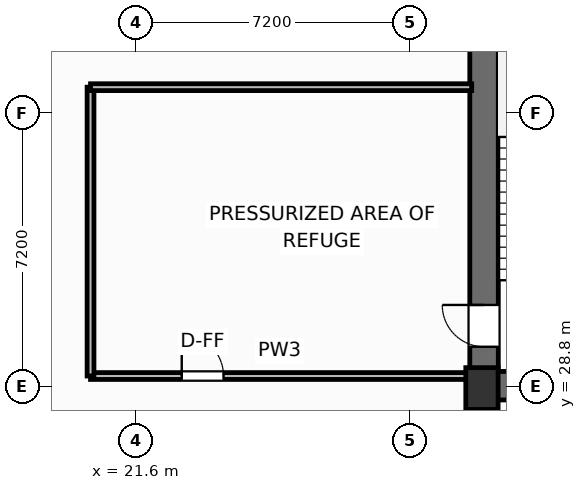
"""IFC4 building model, lengths in metres.
Left out: names, types, materials, properties, quantities, classifications, styles, units other than length and angle.
Written with IfcOpenShell. Run it as: python <this file> out.ifc"""

import sys

from ifc_helpers import new_model, si_unit, direction, frame, frame_2d, origin, origin_2d, place, context, subcontext, project, spatial, rectangle, extrude, element, fill, save


model = new_model("IFC4")
c1 = context("Model", 3, precision=1e-05, world=origin(), true_north=direction((0.0, 1.0)))
c2 = subcontext(c1, "Body", "Model", "MODEL_VIEW")
j1 = project(units=[si_unit("LENGTHUNIT", "METRE"), si_unit("PLANEANGLEUNIT", "RADIAN")], contexts=[c1])
p1 = place(None, origin())
s1 = spatial("IfcSite", under=j1, at=p1, CompositionType="ELEMENT")
p2 = place(p1, origin())
s2 = spatial("IfcBuilding", under=s1, at=p2, CompositionType="ELEMENT")
p3 = place(p2, frame((0.0, 0.0, 162.4)))
s3 = spatial("IfcBuildingStorey", under=s2, at=p3, CompositionType="ELEMENT", Elevation=162.4)
p4 = place(p3, frame((30.7, 28.75, 0.0), z_axis=(0.0, 0.0, 1.0), x_axis=(1.0, 0.0, 0.0)))
e1 = element("IfcColumn", 1, at=p4, inside=s3, PredefinedType="COLUMN", context=c2, shape_type="SweptSolid", body=[
    extrude(rectangle(XDim=0.85, YDim=1.1, at=origin_2d()), origin(), (0.0, 0.0, 1.0), 4.8),
])
p5 = place(p3, frame((30.755, 29.2, 0.0), z_axis=(0.0, 0.0, 1.0), x_axis=(0.0, 1.0, 0.0)))
e2 = element("IfcWall", 2, at=p5, inside=s3, PredefinedType="SHEAR", context=c2, shape_type="SweptSolid", body=[
    extrude(rectangle(XDim=9.22, YDim=0.75, at=frame_2d((4.61, 0.0))), origin(), (0.0, 0.0, 1.0), 4.55),
])
p6 = place(p5, frame((0.65, 0.0, 0.0)))
e3 = element("IfcOpeningElement", 3, at=p6, cuts=e2, PredefinedType="OPENING", context=c2, shape_type="SweptSolid", body=[
    extrude(rectangle(XDim=1.1, YDim=2.15, at=frame_2d((0.55, 1.075))), frame((0.0, 0.385, 0.0), z_axis=(0.0, -1.0, 0.0), x_axis=(1.0, 0.0, 0.0)), (0.0, 0.0, 1.0), 0.77),
])
p7 = place(p3, frame((30.38, 28.825, 0.0), z_axis=(0.0, 0.0, 1.0), x_axis=(1.0, 0.0, 0.0)))
e4 = element("IfcWall", 4, at=p7, inside=s3, PredefinedType="SHEAR", context=c2, shape_type="SweptSolid", body=[
    extrude(rectangle(XDim=4.42, YDim=0.75, at=frame_2d((2.21, 0.0))), origin(), (0.0, 0.0, 1.0), 4.55),
])
p8 = place(p3, frame((20.4, 29.08, 0.0), z_axis=(0.0, 0.0, 1.0), x_axis=(1.0, 0.0, 0.0)))
e5 = element("IfcWall", 5, at=p8, inside=s3, PredefinedType="PARTITIONING", context=c2, shape_type="SweptSolid", body=[
    extrude(rectangle(XDim=9.95, YDim=0.18, at=frame_2d((4.975, 0.0))), origin(), (0.0, 0.0, 1.0), 4.55),
])
p9 = place(p8, frame((2.4, 0.0, 0.0)))
e6 = element("IfcOpeningElement", 6, at=p9, cuts=e5, PredefinedType="OPENING", context=c2, shape_type="SweptSolid", body=[
    extrude(rectangle(XDim=1.1, YDim=2.15, at=frame_2d((0.55, 1.075))), frame((0.0, 0.1, 0.0), z_axis=(0.0, -1.0, 0.0), x_axis=(1.0, 0.0, 0.0)), (0.0, 0.0, 1.0), 0.2),
])
p10 = place(p3, frame((20.4, 29.08, 0.0), z_axis=(0.0, 0.0, 1.0), x_axis=(0.0, 1.0, 0.0)))
e7 = element("IfcWall", 7, at=p10, inside=s3, PredefinedType="PARTITIONING", context=c2, shape_type="SweptSolid", body=[
    extrude(rectangle(XDim=7.6, YDim=0.18, at=frame_2d((3.8, 0.0))), origin(), (0.0, 0.0, 1.0), 4.55),
])
p11 = place(p3, frame((20.4, 36.68, 0.0), z_axis=(0.0, 0.0, 1.0), x_axis=(1.0, 0.0, 0.0)))
e8 = element("IfcWall", 8, at=p11, inside=s3, PredefinedType="PARTITIONING", context=c2, shape_type="SweptSolid", body=[
    extrude(rectangle(XDim=10.03, YDim=0.18, at=frame_2d((5.015, 0.0))), origin(), (0.0, 0.0, 1.0), 4.55),
])
p12 = place(p6, origin())
e9 = element("IfcDoor", 9, at=p12, inside=s3, OperationType="SINGLE_SWING_RIGHT", PredefinedType="DOOR", context=c2, shape_type="SweptSolid", body=[
    extrude(rectangle(XDim=1.1, YDim=2.15, at=frame_2d((0.55, 1.075))), frame((0.0, 0.025, 0.0), z_axis=(0.0, -1.0, 0.0), x_axis=(1.0, 0.0, 0.0)), (0.0, 0.0, 1.0), 0.05),
])
fill(e3, e9)
p13 = place(p9, origin())
e10 = element("IfcDoor", 10, at=p13, inside=s3, OperationType="SINGLE_SWING_LEFT", PredefinedType="DOOR", context=c2, shape_type="SweptSolid", body=[
    extrude(rectangle(XDim=1.1, YDim=2.15, at=frame_2d((0.55, 1.075))), frame((0.0, 0.025, 0.0), z_axis=(0.0, -1.0, 0.0), x_axis=(1.0, 0.0, 0.0)), (0.0, 0.0, 1.0), 0.05),
])
fill(e6, e10)
save(model, sys.argv[1])
